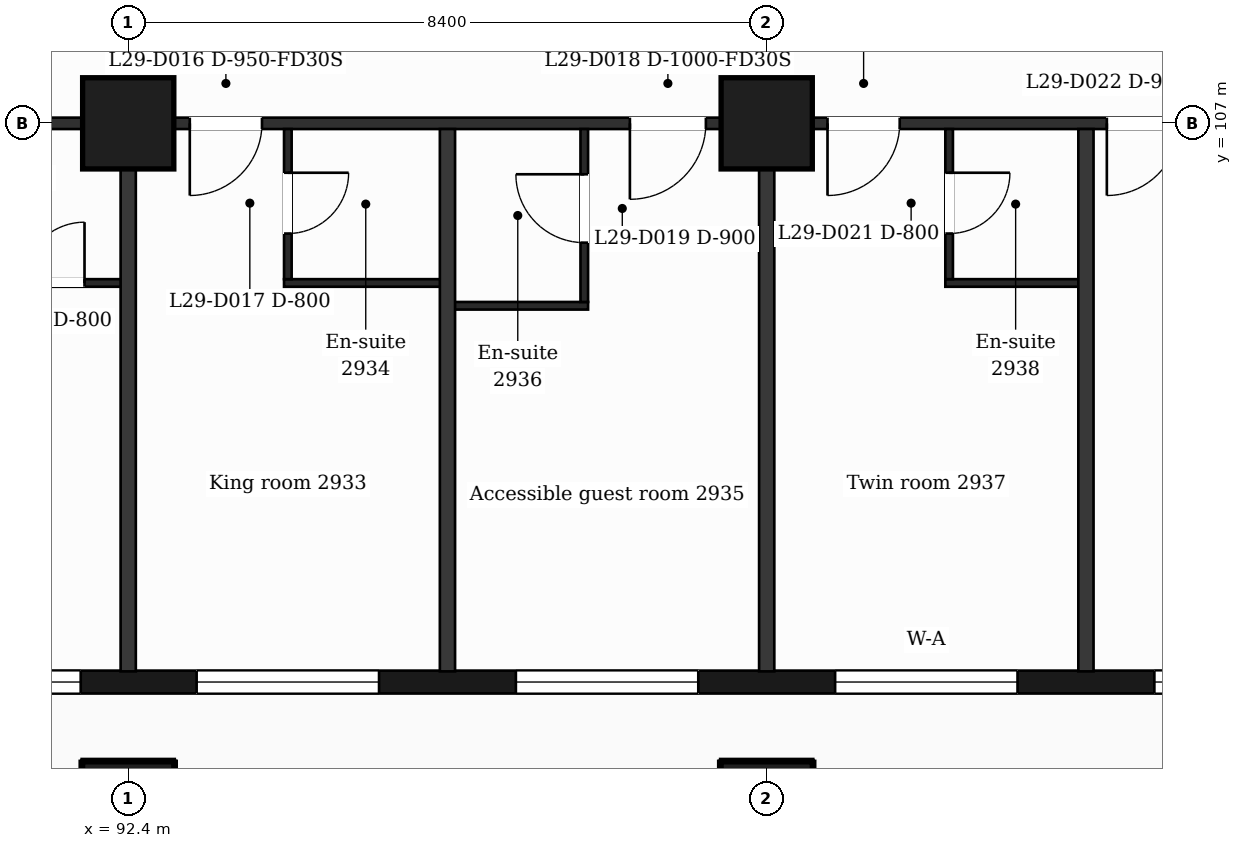
"""IFC4 building model, lengths in metres.
Left out: names, types, materials, properties, quantities, classifications, styles, units other than length and angle.
Written with IfcOpenShell. Run it as: python <this file> out.ifc"""

import sys

from ifc_helpers import new_model, si_unit, direction, frame, frame_2d, origin, origin_2d, place, context, subcontext, project, spatial, rectangle, extrude, element, fill, save


model = new_model("IFC4")
c1 = context("Model", 3, precision=1e-05, world=origin(), true_north=direction((0.0, 1.0)))
c2 = subcontext(c1, "Body", "Model", "MODEL_VIEW")
j1 = project(units=[si_unit("LENGTHUNIT", "METRE"), si_unit("PLANEANGLEUNIT", "RADIAN")], contexts=[c1])
p1 = place(None, origin())
s1 = spatial("IfcSite", under=j1, at=p1, CompositionType="ELEMENT")
p2 = place(p1, origin())
s2 = spatial("IfcBuilding", under=s1, at=p2, CompositionType="ELEMENT")
p3 = place(p2, frame((0.0, 0.0, 124.3)))
s3 = spatial("IfcBuildingStorey", under=s2, at=p3, CompositionType="ELEMENT", Elevation=124.3)
for number, where, z_axis, x_axis in (
    (1, (92.4, 98.0, 0.0), (0.0, 0.0, 1.0), (1.0, 0.0, 0.0)),
    (2, (100.8, 98.0, 0.0), (0.0, 0.0, 1.0), (1.0, 0.0, 0.0)),
    (3, (92.4, 107.0, 0.0), (0.0, 0.0, 1.0), (1.0, 0.0, 0.0)),
    (4, (100.8, 107.0, 0.0), (0.0, 0.0, 1.0), (1.0, 0.0, 0.0)),
):
    element("IfcColumn", number, at=place(p3, frame(where, z_axis=z_axis, x_axis=x_axis)), inside=s3, PredefinedType="COLUMN", context=c2, shape_type="SweptSolid", body=[
        extrude(rectangle(XDim=1.2, YDim=1.2, at=origin_2d()), origin(), (0.0, 0.0, 1.0), 3.7),
    ])
p4 = place(p3, frame((89.85, 99.65, 0.0), z_axis=(0.0, 0.0, 1.0), x_axis=(1.0, 0.0, 0.0)))
e5 = element("IfcWall", 5, at=p4, inside=s3, PredefinedType="SOLIDWALL", context=c2, shape_type="SweptSolid", body=[
    extrude(rectangle(XDim=47.25, YDim=0.3, at=frame_2d((23.625, 0.0))), origin(), (0.0, 0.0, 1.0), 3.38),
])
p5 = place(p4, frame((0.725, 0.0, 0.9)))
e6 = element("IfcOpeningElement", 6, at=p5, cuts=e5, PredefinedType="OPENING", context=c2, shape_type="SweptSolid", body=[
    extrude(rectangle(XDim=1.2, YDim=2.1, at=frame_2d((0.6, 1.05))), frame((0.0, 0.16, 0.0), z_axis=(0.0, -1.0, 0.0), x_axis=(1.0, 0.0, 0.0)), (0.0, 0.0, 1.0), 0.32),
])
p6 = place(p4, frame((3.45, 0.0, 0.9)))
e7 = element("IfcOpeningElement", 7, at=p6, cuts=e5, PredefinedType="OPENING", context=c2, shape_type="SweptSolid", body=[
    extrude(rectangle(XDim=2.4, YDim=2.1, at=frame_2d((1.2, 1.05))), frame((0.0, 0.16, 0.0), z_axis=(0.0, -1.0, 0.0), x_axis=(1.0, 0.0, 0.0)), (0.0, 0.0, 1.0), 0.32),
])
p7 = place(p4, frame((7.65, 0.0, 0.9)))
e8 = element("IfcOpeningElement", 8, at=p7, cuts=e5, PredefinedType="OPENING", context=c2, shape_type="SweptSolid", body=[
    extrude(rectangle(XDim=2.4, YDim=2.1, at=frame_2d((1.2, 1.05))), frame((0.0, 0.16, 0.0), z_axis=(0.0, -1.0, 0.0), x_axis=(1.0, 0.0, 0.0)), (0.0, 0.0, 1.0), 0.32),
])
p8 = place(p4, frame((11.85, 0.0, 0.9)))
e9 = element("IfcOpeningElement", 9, at=p8, cuts=e5, PredefinedType="OPENING", context=c2, shape_type="SweptSolid", body=[
    extrude(rectangle(XDim=2.4, YDim=2.1, at=frame_2d((1.2, 1.05))), frame((0.0, 0.16, 0.0), z_axis=(0.0, -1.0, 0.0), x_axis=(1.0, 0.0, 0.0)), (0.0, 0.0, 1.0), 0.32),
])
p9 = place(p4, frame((16.05, 0.0, 0.9)))
e10 = element("IfcOpeningElement", 10, at=p9, cuts=e5, PredefinedType="OPENING", context=c2, shape_type="SweptSolid", body=[
    extrude(rectangle(XDim=2.4, YDim=2.1, at=frame_2d((1.2, 1.05))), frame((0.0, 0.16, 0.0), z_axis=(0.0, -1.0, 0.0), x_axis=(1.0, 0.0, 0.0)), (0.0, 0.0, 1.0), 0.32),
])
p10 = place(p4, frame((20.25, 0.0, 0.9)))
e11 = element("IfcOpeningElement", 11, at=p10, cuts=e5, PredefinedType="OPENING", context=c2, shape_type="SweptSolid", body=[
    extrude(rectangle(XDim=2.4, YDim=2.1, at=frame_2d((1.2, 1.05))), frame((0.0, 0.16, 0.0), z_axis=(0.0, -1.0, 0.0), x_axis=(1.0, 0.0, 0.0)), (0.0, 0.0, 1.0), 0.32),
])
p11 = place(p4, frame((25.05, 0.0, 0.9)))
e12 = element("IfcOpeningElement", 12, at=p11, cuts=e5, PredefinedType="OPENING", context=c2, shape_type="SweptSolid", body=[
    extrude(rectangle(XDim=1.2, YDim=2.1, at=frame_2d((0.6, 1.05))), frame((0.0, 0.16, 0.0), z_axis=(0.0, -1.0, 0.0), x_axis=(1.0, 0.0, 0.0)), (0.0, 0.0, 1.0), 0.32),
])
p12 = place(p4, frame((29.25, 0.0, 0.9)))
e13 = element("IfcOpeningElement", 13, at=p12, cuts=e5, PredefinedType="OPENING", context=c2, shape_type="SweptSolid", body=[
    extrude(rectangle(XDim=1.2, YDim=2.1, at=frame_2d((0.6, 1.05))), frame((0.0, 0.16, 0.0), z_axis=(0.0, -1.0, 0.0), x_axis=(1.0, 0.0, 0.0)), (0.0, 0.0, 1.0), 0.32),
])
p13 = place(p4, frame((32.55, 0.0, 0.0)))
e14 = element("IfcOpeningElement", 14, at=p13, cuts=e5, PredefinedType="OPENING", context=c2, shape_type="SweptSolid", body=[
    extrude(rectangle(XDim=1.2, YDim=2.4, at=frame_2d((0.6, 1.2))), frame((0.0, 0.16, 0.0), z_axis=(0.0, -1.0, 0.0), x_axis=(1.0, 0.0, 0.0)), (0.0, 0.0, 1.0), 0.32),
])
p14 = place(p4, frame((34.35, 0.0, 0.9)))
e15 = element("IfcOpeningElement", 15, at=p14, cuts=e5, PredefinedType="OPENING", context=c2, shape_type="SweptSolid", body=[
    extrude(rectangle(XDim=1.2, YDim=2.1, at=frame_2d((0.6, 1.05))), frame((0.0, 0.16, 0.0), z_axis=(0.0, -1.0, 0.0), x_axis=(1.0, 0.0, 0.0)), (0.0, 0.0, 1.0), 0.32),
])
p15 = place(p4, frame((37.05, 0.0, 0.9)))
e16 = element("IfcOpeningElement", 16, at=p15, cuts=e5, PredefinedType="OPENING", context=c2, shape_type="SweptSolid", body=[
    extrude(rectangle(XDim=2.4, YDim=2.1, at=frame_2d((1.2, 1.05))), frame((0.0, 0.16, 0.0), z_axis=(0.0, -1.0, 0.0), x_axis=(1.0, 0.0, 0.0)), (0.0, 0.0, 1.0), 0.32),
])
p16 = place(p4, frame((40.95, 0.0, 0.0)))
e17 = element("IfcOpeningElement", 17, at=p16, cuts=e5, PredefinedType="OPENING", context=c2, shape_type="SweptSolid", body=[
    extrude(rectangle(XDim=1.2, YDim=2.4, at=frame_2d((0.6, 1.2))), frame((0.0, 0.16, 0.0), z_axis=(0.0, -1.0, 0.0), x_axis=(1.0, 0.0, 0.0)), (0.0, 0.0, 1.0), 0.32),
])
p17 = place(p4, frame((42.75, 0.0, 0.9)))
e18 = element("IfcOpeningElement", 18, at=p17, cuts=e5, PredefinedType="OPENING", context=c2, shape_type="SweptSolid", body=[
    extrude(rectangle(XDim=1.2, YDim=2.1, at=frame_2d((0.6, 1.05))), frame((0.0, 0.16, 0.0), z_axis=(0.0, -1.0, 0.0), x_axis=(1.0, 0.0, 0.0)), (0.0, 0.0, 1.0), 0.32),
])
p18 = place(p4, frame((45.25, 0.0, 0.9)))
e19 = element("IfcOpeningElement", 19, at=p18, cuts=e5, PredefinedType="OPENING", context=c2, shape_type="SweptSolid", body=[
    extrude(rectangle(XDim=1.2, YDim=2.1, at=frame_2d((0.6, 1.05))), frame((0.0, 0.16, 0.0), z_axis=(0.0, -1.0, 0.0), x_axis=(1.0, 0.0, 0.0)), (0.0, 0.0, 1.0), 0.32),
])
p19 = place(p3, frame((96.6, 104.6, 0.0), z_axis=(0.0, 0.0, 1.0), x_axis=(1.0, 0.0, 0.0)))
e20 = element("IfcWall", 20, at=p19, inside=s3, PredefinedType="PARTITIONING", context=c2, shape_type="SweptSolid", body=[
    extrude(rectangle(XDim=1.85, YDim=0.1, at=frame_2d((0.925, 0.0))), origin(), (0.0, 0.0, 1.0), 3.38),
])
p20 = place(p3, frame((89.95, 104.9, 0.0), z_axis=(0.0, 0.0, 1.0), x_axis=(1.0, 0.0, 0.0)))
e21 = element("IfcWall", 21, at=p20, inside=s3, PredefinedType="PARTITIONING", context=c2, shape_type="SweptSolid", body=[
    extrude(rectangle(XDim=2.45, YDim=0.1, at=frame_2d((1.225, 0.0))), origin(), (0.0, 0.0, 1.0), 3.38),
])
p21 = place(p20, frame((1.075, 0.0, 0.0)))
e22 = element("IfcOpeningElement", 22, at=p21, cuts=e21, PredefinedType="OPENING", context=c2, shape_type="SweptSolid", body=[
    extrude(rectangle(XDim=0.8, YDim=2.1, at=frame_2d((0.4, 1.05))), frame((0.0, 0.06, 0.0), z_axis=(0.0, -1.0, 0.0), x_axis=(1.0, 0.0, 0.0)), (0.0, 0.0, 1.0), 0.12),
])
p22 = place(p3, frame((94.45, 104.9, 0.0), z_axis=(0.0, 0.0, 1.0), x_axis=(1.0, 0.0, 0.0)))
e23 = element("IfcWall", 23, at=p22, inside=s3, PredefinedType="PARTITIONING", context=c2, shape_type="SweptSolid", body=[
    extrude(rectangle(XDim=2.15, YDim=0.1, at=frame_2d((1.075, 0.0))), origin(), (0.0, 0.0, 1.0), 3.38),
])
p23 = place(p3, frame((103.15, 104.9, 0.0), z_axis=(0.0, 0.0, 1.0), x_axis=(1.0, 0.0, 0.0)))
e24 = element("IfcWall", 24, at=p23, inside=s3, PredefinedType="PARTITIONING", context=c2, shape_type="SweptSolid", body=[
    extrude(rectangle(XDim=1.85, YDim=0.1, at=frame_2d((0.925, 0.0))), origin(), (0.0, 0.0, 1.0), 3.38),
])
p24 = place(p3, frame((87.018, 107.0, 0.0), z_axis=(0.0, 0.0, 1.0), x_axis=(1.0, 0.0, 0.0)))
e25 = element("IfcWall", 25, at=p24, inside=s3, PredefinedType="PARTITIONING", context=c2, shape_type="SweptSolid", body=[
    extrude(rectangle(XDim=52.765, YDim=0.15, at=frame_2d((26.382, 0.0))), origin(), (0.0, 0.0, 1.0), 3.38),
])
p25 = place(p24, frame((1.276, 0.0, 0.0)))
e26 = element("IfcOpeningElement", 26, at=p25, cuts=e25, PredefinedType="OPENING", context=c2, shape_type="SweptSolid", body=[
    extrude(rectangle(XDim=0.95, YDim=2.1, at=frame_2d((0.475, 1.05))), frame((0.0, 0.085, 0.0), z_axis=(0.0, -1.0, 0.0), x_axis=(1.0, 0.0, 0.0)), (0.0, 0.0, 1.0), 0.17),
])
p26 = place(p24, frame((6.192, 0.0, 0.0)))
e27 = element("IfcOpeningElement", 27, at=p26, cuts=e25, PredefinedType="OPENING", context=c2, shape_type="SweptSolid", body=[
    extrude(rectangle(XDim=0.95, YDim=2.1, at=frame_2d((0.475, 1.05))), frame((0.0, 0.085, 0.0), z_axis=(0.0, -1.0, 0.0), x_axis=(1.0, 0.0, 0.0)), (0.0, 0.0, 1.0), 0.17),
])
p27 = place(p24, frame((11.982, 0.0, 0.0)))
e28 = element("IfcOpeningElement", 28, at=p27, cuts=e25, PredefinedType="OPENING", context=c2, shape_type="SweptSolid", body=[
    extrude(rectangle(XDim=1.0, YDim=2.1, at=frame_2d((0.5, 1.05))), frame((0.0, 0.085, 0.0), z_axis=(0.0, -1.0, 0.0), x_axis=(1.0, 0.0, 0.0)), (0.0, 0.0, 1.0), 0.17),
])
p28 = place(p24, frame((14.582, 0.0, 0.0)))
e29 = element("IfcOpeningElement", 29, at=p28, cuts=e25, PredefinedType="OPENING", context=c2, shape_type="SweptSolid", body=[
    extrude(rectangle(XDim=0.95, YDim=2.1, at=frame_2d((0.475, 1.05))), frame((0.0, 0.085, 0.0), z_axis=(0.0, -1.0, 0.0), x_axis=(1.0, 0.0, 0.0)), (0.0, 0.0, 1.0), 0.17),
])
p29 = place(p24, frame((18.257, 0.0, 0.0)))
e30 = element("IfcOpeningElement", 30, at=p29, cuts=e25, PredefinedType="OPENING", context=c2, shape_type="SweptSolid", body=[
    extrude(rectangle(XDim=0.95, YDim=2.1, at=frame_2d((0.475, 1.05))), frame((0.0, 0.085, 0.0), z_axis=(0.0, -1.0, 0.0), x_axis=(1.0, 0.0, 0.0)), (0.0, 0.0, 1.0), 0.17),
])
p30 = place(p24, frame((22.992, 0.0, 0.0)))
e31 = element("IfcOpeningElement", 31, at=p30, cuts=e25, PredefinedType="OPENING", context=c2, shape_type="SweptSolid", body=[
    extrude(rectangle(XDim=0.95, YDim=2.1, at=frame_2d((0.475, 1.05))), frame((0.0, 0.085, 0.0), z_axis=(0.0, -1.0, 0.0), x_axis=(1.0, 0.0, 0.0)), (0.0, 0.0, 1.0), 0.17),
])
p31 = place(p24, frame((26.632, 0.0, 0.0)))
e32 = element("IfcOpeningElement", 32, at=p31, cuts=e25, PredefinedType="OPENING", context=c2, shape_type="SweptSolid", body=[
    extrude(rectangle(XDim=1.0, YDim=2.1, at=frame_2d((0.5, 1.05))), frame((0.0, 0.085, 0.0), z_axis=(0.0, -1.0, 0.0), x_axis=(1.0, 0.0, 0.0)), (0.0, 0.0, 1.0), 0.17),
])
p32 = place(p24, frame((33.557, 0.0, 0.0)))
e33 = element("IfcOpeningElement", 33, at=p32, cuts=e25, PredefinedType="OPENING", context=c2, shape_type="SweptSolid", body=[
    extrude(rectangle(XDim=0.95, YDim=2.1, at=frame_2d((0.475, 1.05))), frame((0.0, 0.085, 0.0), z_axis=(0.0, -1.0, 0.0), x_axis=(1.0, 0.0, 0.0)), (0.0, 0.0, 1.0), 0.17),
])
p33 = place(p24, frame((37.182, 0.0, 0.0)))
e34 = element("IfcOpeningElement", 34, at=p33, cuts=e25, PredefinedType="OPENING", context=c2, shape_type="SweptSolid", body=[
    extrude(rectangle(XDim=0.95, YDim=2.1, at=frame_2d((0.475, 1.05))), frame((0.0, 0.085, 0.0), z_axis=(0.0, -1.0, 0.0), x_axis=(1.0, 0.0, 0.0)), (0.0, 0.0, 1.0), 0.17),
])
p34 = place(p24, frame((41.957, 0.0, 0.0)))
e35 = element("IfcOpeningElement", 35, at=p34, cuts=e25, PredefinedType="OPENING", context=c2, shape_type="SweptSolid", body=[
    extrude(rectangle(XDim=0.95, YDim=2.1, at=frame_2d((0.475, 1.05))), frame((0.0, 0.085, 0.0), z_axis=(0.0, -1.0, 0.0), x_axis=(1.0, 0.0, 0.0)), (0.0, 0.0, 1.0), 0.17),
])
p35 = place(p24, frame((45.622, 0.0, 0.0)))
e36 = element("IfcOpeningElement", 36, at=p35, cuts=e25, PredefinedType="OPENING", context=c2, shape_type="SweptSolid", body=[
    extrude(rectangle(XDim=0.95, YDim=2.1, at=frame_2d((0.475, 1.05))), frame((0.0, 0.085, 0.0), z_axis=(0.0, -1.0, 0.0), x_axis=(1.0, 0.0, 0.0)), (0.0, 0.0, 1.0), 0.17),
])
p36 = place(p24, frame((48.56, 0.0, 0.0)))
e37 = element("IfcOpeningElement", 37, at=p36, cuts=e25, PredefinedType="OPENING", context=c2, shape_type="SweptSolid", body=[
    extrude(rectangle(XDim=0.95, YDim=2.1, at=frame_2d((0.475, 1.05))), frame((0.0, 0.085, 0.0), z_axis=(0.0, -1.0, 0.0), x_axis=(1.0, 0.0, 0.0)), (0.0, 0.0, 1.0), 0.17),
])
p37 = place(p3, frame((92.4, 99.79, 0.0), z_axis=(0.0, 0.0, 1.0), x_axis=(0.0, 1.0, 0.0)))
e38 = element("IfcWall", 38, at=p37, inside=s3, PredefinedType="PARTITIONING", context=c2, shape_type="SweptSolid", body=[
    extrude(rectangle(XDim=7.135, YDim=0.2, at=frame_2d((3.567, 0.0))), origin(), (0.0, 0.0, 1.0), 3.38),
])
p38 = place(p3, frame((94.5, 104.95, 0.0), z_axis=(0.0, 0.0, 1.0), x_axis=(0.0, 1.0, 0.0)))
e39 = element("IfcWall", 39, at=p38, inside=s3, PredefinedType="PARTITIONING", context=c2, shape_type="SweptSolid", body=[
    extrude(rectangle(XDim=1.975, YDim=0.1, at=frame_2d((0.988, 0.0))), origin(), (0.0, 0.0, 1.0), 3.38),
])
p39 = place(p38, frame((0.6, 0.0, 0.0)))
e40 = element("IfcOpeningElement", 40, at=p39, cuts=e39, PredefinedType="OPENING", context=c2, shape_type="SweptSolid", body=[
    extrude(rectangle(XDim=0.8, YDim=2.1, at=frame_2d((0.4, 1.05))), frame((0.0, 0.06, 0.0), z_axis=(0.0, -1.0, 0.0), x_axis=(1.0, 0.0, 0.0)), (0.0, 0.0, 1.0), 0.12),
])
p40 = place(p3, frame((96.6, 99.79, 0.0), z_axis=(0.0, 0.0, 1.0), x_axis=(0.0, 1.0, 0.0)))
e41 = element("IfcWall", 41, at=p40, inside=s3, PredefinedType="PARTITIONING", context=c2, shape_type="SweptSolid", body=[
    extrude(rectangle(XDim=7.135, YDim=0.2, at=frame_2d((3.567, 0.0))), origin(), (0.0, 0.0, 1.0), 3.38),
])
p41 = place(p3, frame((98.4, 104.65, 0.0), z_axis=(0.0, 0.0, 1.0), x_axis=(0.0, 1.0, 0.0)))
e42 = element("IfcWall", 42, at=p41, inside=s3, PredefinedType="PARTITIONING", context=c2, shape_type="SweptSolid", body=[
    extrude(rectangle(XDim=2.275, YDim=0.1, at=frame_2d((1.138, 0.0))), origin(), (0.0, 0.0, 1.0), 3.38),
])
p42 = place(p41, frame((0.78, 0.0, 0.0)))
e43 = element("IfcOpeningElement", 43, at=p42, cuts=e42, PredefinedType="OPENING", context=c2, shape_type="SweptSolid", body=[
    extrude(rectangle(XDim=0.9, YDim=2.1, at=frame_2d((0.45, 1.05))), frame((0.0, 0.06, 0.0), z_axis=(0.0, -1.0, 0.0), x_axis=(1.0, 0.0, 0.0)), (0.0, 0.0, 1.0), 0.12),
])
p43 = place(p3, frame((100.8, 99.79, 0.0), z_axis=(0.0, 0.0, 1.0), x_axis=(0.0, 1.0, 0.0)))
e44 = element("IfcWall", 44, at=p43, inside=s3, PredefinedType="PARTITIONING", context=c2, shape_type="SweptSolid", body=[
    extrude(rectangle(XDim=7.135, YDim=0.2, at=frame_2d((3.567, 0.0))), origin(), (0.0, 0.0, 1.0), 3.38),
])
p44 = place(p3, frame((103.2, 104.95, 0.0), z_axis=(0.0, 0.0, 1.0), x_axis=(0.0, 1.0, 0.0)))
e45 = element("IfcWall", 45, at=p44, inside=s3, PredefinedType="PARTITIONING", context=c2, shape_type="SweptSolid", body=[
    extrude(rectangle(XDim=1.975, YDim=0.1, at=frame_2d((0.988, 0.0))), origin(), (0.0, 0.0, 1.0), 3.38),
])
p45 = place(p44, frame((0.6, 0.0, 0.0)))
e46 = element("IfcOpeningElement", 46, at=p45, cuts=e45, PredefinedType="OPENING", context=c2, shape_type="SweptSolid", body=[
    extrude(rectangle(XDim=0.8, YDim=2.1, at=frame_2d((0.4, 1.05))), frame((0.0, 0.06, 0.0), z_axis=(0.0, -1.0, 0.0), x_axis=(1.0, 0.0, 0.0)), (0.0, 0.0, 1.0), 0.12),
])
p46 = place(p3, frame((105.0, 99.79, 0.0), z_axis=(0.0, 0.0, 1.0), x_axis=(0.0, 1.0, 0.0)))
e47 = element("IfcWall", 47, at=p46, inside=s3, PredefinedType="PARTITIONING", context=c2, shape_type="SweptSolid", body=[
    extrude(rectangle(XDim=7.135, YDim=0.2, at=frame_2d((3.567, 0.0))), origin(), (0.0, 0.0, 1.0), 3.38),
])
p47 = place(p5, origin())
e48 = element("IfcWindow", 48, at=p47, inside=s3, PartitioningType="SINGLE_PANEL", PredefinedType="WINDOW", context=c2, shape_type="SweptSolid", body=[
    extrude(rectangle(XDim=1.2, YDim=2.1, at=frame_2d((0.6, 1.05))), frame((0.0, 0.03, 0.0), z_axis=(0.0, -1.0, 0.0), x_axis=(1.0, 0.0, 0.0)), (0.0, 0.0, 1.0), 0.06),
])
fill(e6, e48)
p48 = place(p6, origin())
e49 = element("IfcWindow", 49, at=p48, inside=s3, PartitioningType="SINGLE_PANEL", PredefinedType="WINDOW", context=c2, shape_type="SweptSolid", body=[
    extrude(rectangle(XDim=2.4, YDim=2.1, at=frame_2d((1.2, 1.05))), frame((0.0, 0.03, 0.0), z_axis=(0.0, -1.0, 0.0), x_axis=(1.0, 0.0, 0.0)), (0.0, 0.0, 1.0), 0.06),
])
fill(e7, e49)
p49 = place(p7, origin())
e50 = element("IfcWindow", 50, at=p49, inside=s3, PartitioningType="SINGLE_PANEL", PredefinedType="WINDOW", context=c2, shape_type="SweptSolid", body=[
    extrude(rectangle(XDim=2.4, YDim=2.1, at=frame_2d((1.2, 1.05))), frame((0.0, 0.03, 0.0), z_axis=(0.0, -1.0, 0.0), x_axis=(1.0, 0.0, 0.0)), (0.0, 0.0, 1.0), 0.06),
])
fill(e8, e50)
p50 = place(p8, origin())
e51 = element("IfcWindow", 51, at=p50, inside=s3, PartitioningType="SINGLE_PANEL", PredefinedType="WINDOW", context=c2, shape_type="SweptSolid", body=[
    extrude(rectangle(XDim=2.4, YDim=2.1, at=frame_2d((1.2, 1.05))), frame((0.0, 0.03, 0.0), z_axis=(0.0, -1.0, 0.0), x_axis=(1.0, 0.0, 0.0)), (0.0, 0.0, 1.0), 0.06),
])
fill(e9, e51)
p51 = place(p9, origin())
e52 = element("IfcWindow", 52, at=p51, inside=s3, PartitioningType="SINGLE_PANEL", PredefinedType="WINDOW", context=c2, shape_type="SweptSolid", body=[
    extrude(rectangle(XDim=2.4, YDim=2.1, at=frame_2d((1.2, 1.05))), frame((0.0, 0.03, 0.0), z_axis=(0.0, -1.0, 0.0), x_axis=(1.0, 0.0, 0.0)), (0.0, 0.0, 1.0), 0.06),
])
fill(e10, e52)
p52 = place(p21, origin())
e53 = element("IfcDoor", 53, at=p52, inside=s3, OperationType="SINGLE_SWING_RIGHT", PredefinedType="DOOR", context=c2, shape_type="SweptSolid", body=[
    extrude(rectangle(XDim=0.8, YDim=2.1, at=frame_2d((0.4, 1.05))), frame((0.0, 0.025, 0.0), z_axis=(0.0, -1.0, 0.0), x_axis=(1.0, 0.0, 0.0)), (0.0, 0.0, 1.0), 0.05),
])
fill(e22, e53)
p53 = place(p26, origin())
e54 = element("IfcDoor", 54, at=p53, inside=s3, OperationType="SINGLE_SWING_LEFT", PredefinedType="DOOR", context=c2, shape_type="SweptSolid", body=[
    extrude(rectangle(XDim=0.95, YDim=2.1, at=frame_2d((0.475, 1.05))), frame((0.0, 0.025, 0.0), z_axis=(0.0, -1.0, 0.0), x_axis=(1.0, 0.0, 0.0)), (0.0, 0.0, 1.0), 0.05),
])
fill(e27, e54)
p54 = place(p39, origin())
e55 = element("IfcDoor", 55, at=p54, inside=s3, OperationType="SINGLE_SWING_RIGHT", PredefinedType="DOOR", context=c2, shape_type="SweptSolid", body=[
    extrude(rectangle(XDim=0.8, YDim=2.1, at=frame_2d((0.4, 1.05))), frame((0.0, 0.025, 0.0), z_axis=(0.0, -1.0, 0.0), x_axis=(1.0, 0.0, 0.0)), (0.0, 0.0, 1.0), 0.05),
])
fill(e40, e55)
p55 = place(p27, origin())
e56 = element("IfcDoor", 56, at=p55, inside=s3, OperationType="SINGLE_SWING_LEFT", PredefinedType="DOOR", context=c2, shape_type="SweptSolid", body=[
    extrude(rectangle(XDim=1.0, YDim=2.1, at=frame_2d((0.5, 1.05))), frame((0.0, 0.025, 0.0), z_axis=(0.0, -1.0, 0.0), x_axis=(1.0, 0.0, 0.0)), (0.0, 0.0, 1.0), 0.05),
])
fill(e28, e56)
p56 = place(p42, origin())
e57 = element("IfcDoor", 57, at=p56, inside=s3, OperationType="SINGLE_SWING_RIGHT", PredefinedType="DOOR", context=c2, shape_type="SweptSolid", body=[
    extrude(rectangle(XDim=0.9, YDim=2.1, at=frame_2d((0.45, 1.05))), frame((0.0, 0.025, 0.0), z_axis=(0.0, -1.0, 0.0), x_axis=(1.0, 0.0, 0.0)), (0.0, 0.0, 1.0), 0.05),
])
fill(e43, e57)
p57 = place(p28, origin())
e58 = element("IfcDoor", 58, at=p57, inside=s3, OperationType="SINGLE_SWING_LEFT", PredefinedType="DOOR", context=c2, shape_type="SweptSolid", body=[
    extrude(rectangle(XDim=0.95, YDim=2.1, at=frame_2d((0.475, 1.05))), frame((0.0, 0.025, 0.0), z_axis=(0.0, -1.0, 0.0), x_axis=(1.0, 0.0, 0.0)), (0.0, 0.0, 1.0), 0.05),
])
fill(e29, e58)
p58 = place(p45, origin())
e59 = element("IfcDoor", 59, at=p58, inside=s3, OperationType="SINGLE_SWING_RIGHT", PredefinedType="DOOR", context=c2, shape_type="SweptSolid", body=[
    extrude(rectangle(XDim=0.8, YDim=2.1, at=frame_2d((0.4, 1.05))), frame((0.0, 0.025, 0.0), z_axis=(0.0, -1.0, 0.0), x_axis=(1.0, 0.0, 0.0)), (0.0, 0.0, 1.0), 0.05),
])
fill(e46, e59)
p59 = place(p29, origin())
e60 = element("IfcDoor", 60, at=p59, inside=s3, OperationType="SINGLE_SWING_LEFT", PredefinedType="DOOR", context=c2, shape_type="SweptSolid", body=[
    extrude(rectangle(XDim=0.95, YDim=2.1, at=frame_2d((0.475, 1.05))), frame((0.0, 0.025, 0.0), z_axis=(0.0, -1.0, 0.0), x_axis=(1.0, 0.0, 0.0)), (0.0, 0.0, 1.0), 0.05),
])
fill(e30, e60)
save(model, sys.argv[1])
